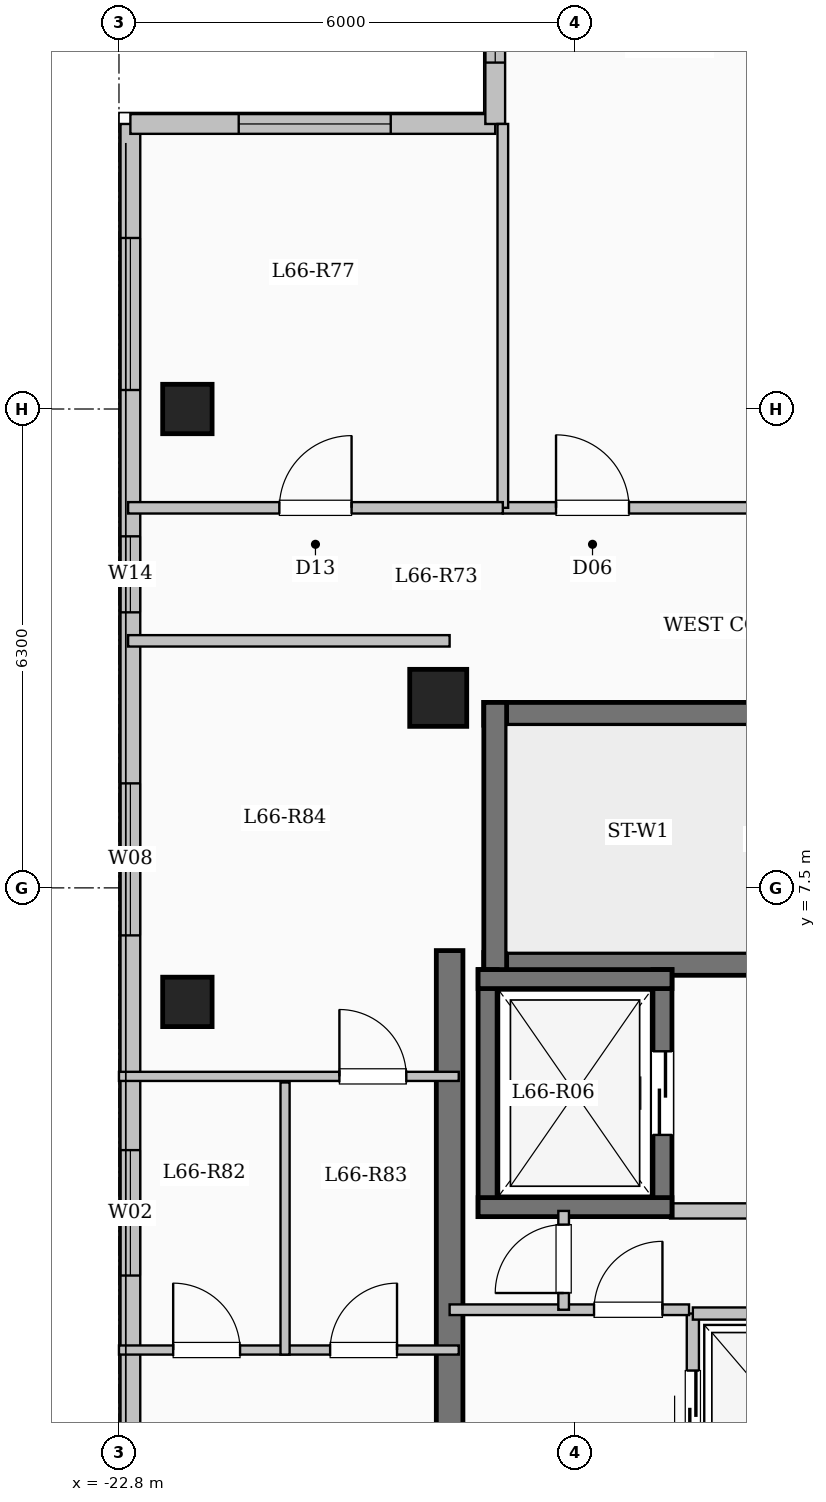
"""IFC4 building model, lengths in metres.
Left out: names, types, materials, properties, quantities, classifications, styles, units other than length and angle.
Written with IfcOpenShell. Run it as: python <this file> out.ifc"""

import sys

from ifc_helpers import new_model, si_unit, direction, frame, frame_2d, origin, origin_2d, place, context, subcontext, project, spatial, rectangle, extrude, element, fill, save


model = new_model("IFC4")
c1 = context("Model", 3, precision=1e-05, world=origin(), true_north=direction((0.0, 1.0)))
c2 = subcontext(c1, "Body", "Model", "MODEL_VIEW")
j1 = project(units=[si_unit("LENGTHUNIT", "METRE"), si_unit("PLANEANGLEUNIT", "RADIAN")], contexts=[c1])
p1 = place(None, origin())
s1 = spatial("IfcSite", under=j1, at=p1, CompositionType="ELEMENT")
p2 = place(p1, origin())
s2 = spatial("IfcBuilding", under=s1, at=p2, CompositionType="ELEMENT")
p3 = place(p2, frame((0.0, 0.0, 244.85)))
s3 = spatial("IfcBuildingStorey", under=s2, at=p3, CompositionType="ELEMENT", Elevation=244.85)
p4 = place(p3, frame((-18.6, 10.0, 0.0), z_axis=(0.0, 0.0, 1.0), x_axis=(1.0, 0.0, 0.0)))
e1 = element("IfcColumn", 1, at=p4, inside=s3, PredefinedType="COLUMN", context=c2, shape_type="SweptSolid", body=[
    extrude(rectangle(XDim=0.75, YDim=0.75, at=origin_2d()), origin(), (0.0, 0.0, 1.0), 3.35),
])
for number, where, z_axis, x_axis in (
    (2, (-21.9, 6.0, 0.0), (0.0, 0.0, 1.0), (1.0, 0.0, 0.0)),
    (3, (-21.9, 13.8, 0.0), (0.0, 0.0, 1.0), (1.0, 0.0, 0.0)),
):
    element("IfcColumn", number, at=place(p3, frame(where, z_axis=z_axis, x_axis=x_axis)), inside=s3, PredefinedType="COLUMN", context=c2, shape_type="SweptSolid", body=[
        extrude(rectangle(XDim=0.65, YDim=0.65, at=origin_2d()), origin(), (0.0, 0.0, 1.0), 3.35),
    ])
p5 = place(p3, frame((-22.65, -17.55, 0.0), z_axis=(0.0, 0.0, 1.0), x_axis=(0.0, 1.0, 0.0)))
e4 = element("IfcWall", 4, at=p5, inside=s3, PredefinedType="SOLIDWALL", context=c2, shape_type="SweptSolid", body=[
    extrude(rectangle(XDim=35.1, YDim=0.26, at=frame_2d((17.55, 0.0))), origin(), (0.0, 0.0, 1.0), 3.1),
])
p6 = place(p5, frame((2.975, 0.0, 0.9)))
e5 = element("IfcOpeningElement", 5, at=p6, cuts=e4, PredefinedType="OPENING", context=c2, shape_type="SweptSolid", body=[
    extrude(rectangle(XDim=2.2, YDim=1.75, at=frame_2d((1.1, 0.875))), frame((0.0, 0.14, 0.0), z_axis=(0.0, -1.0, 0.0), x_axis=(1.0, 0.0, 0.0)), (0.0, 0.0, 1.0), 0.28),
])
p7 = place(p5, frame((8.625, 0.0, 0.95)))
e6 = element("IfcOpeningElement", 6, at=p7, cuts=e4, PredefinedType="OPENING", context=c2, shape_type="SweptSolid", body=[
    extrude(rectangle(XDim=1.2, YDim=1.5, at=frame_2d((0.6, 0.75))), frame((0.0, 0.14, 0.0), z_axis=(0.0, -1.0, 0.0), x_axis=(1.0, 0.0, 0.0)), (0.0, 0.0, 1.0), 0.28),
])
p8 = place(p5, frame((13.55, 0.0, 0.9)))
e7 = element("IfcOpeningElement", 7, at=p8, cuts=e4, PredefinedType="OPENING", context=c2, shape_type="SweptSolid", body=[
    extrude(rectangle(XDim=2.2, YDim=1.75, at=frame_2d((1.1, 0.875))), frame((0.0, 0.14, 0.0), z_axis=(0.0, -1.0, 0.0), x_axis=(1.0, 0.0, 0.0)), (0.0, 0.0, 1.0), 0.28),
])
p9 = place(p5, frame((19.95, 0.0, 0.9)))
e8 = element("IfcOpeningElement", 8, at=p9, cuts=e4, PredefinedType="OPENING", context=c2, shape_type="SweptSolid", body=[
    extrude(rectangle(XDim=1.65, YDim=1.6, at=frame_2d((0.825, 0.8))), frame((0.0, 0.14, 0.0), z_axis=(0.0, -1.0, 0.0), x_axis=(1.0, 0.0, 0.0)), (0.0, 0.0, 1.0), 0.28),
])
p10 = place(p5, frame((24.425, 0.0, 0.9)))
e9 = element("IfcOpeningElement", 9, at=p10, cuts=e4, PredefinedType="OPENING", context=c2, shape_type="SweptSolid", body=[
    extrude(rectangle(XDim=2.0, YDim=1.7, at=frame_2d((1.0, 0.85))), frame((0.0, 0.14, 0.0), z_axis=(0.0, -1.0, 0.0), x_axis=(1.0, 0.0, 0.0)), (0.0, 0.0, 1.0), 0.28),
])
p11 = place(p5, frame((28.675, 0.0, 0.95)))
e10 = element("IfcOpeningElement", 10, at=p11, cuts=e4, PredefinedType="OPENING", context=c2, shape_type="SweptSolid", body=[
    extrude(rectangle(XDim=1.0, YDim=1.5, at=frame_2d((0.5, 0.75))), frame((0.0, 0.14, 0.0), z_axis=(0.0, -1.0, 0.0), x_axis=(1.0, 0.0, 0.0)), (0.0, 0.0, 1.0), 0.28),
])
p12 = place(p5, frame((31.6, 0.0, 0.9)))
e11 = element("IfcOpeningElement", 11, at=p12, cuts=e4, PredefinedType="OPENING", context=c2, shape_type="SweptSolid", body=[
    extrude(rectangle(XDim=2.0, YDim=1.7, at=frame_2d((1.0, 0.85))), frame((0.0, 0.14, 0.0), z_axis=(0.0, -1.0, 0.0), x_axis=(1.0, 0.0, 0.0)), (0.0, 0.0, 1.0), 0.28),
])
p13 = place(p3, frame((-22.65, 17.55, 0.0), z_axis=(0.0, 0.0, 1.0), x_axis=(1.0, 0.0, 0.0)))
e12 = element("IfcWall", 12, at=p13, inside=s3, PredefinedType="SOLIDWALL", context=c2, shape_type="SweptSolid", body=[
    extrude(rectangle(XDim=4.8, YDim=0.26, at=frame_2d((2.4, 0.0))), origin(), (0.0, 0.0, 1.0), 3.1),
])
p14 = place(p13, frame((1.425, 0.0, 0.9)))
e13 = element("IfcOpeningElement", 13, at=p14, cuts=e12, PredefinedType="OPENING", context=c2, shape_type="SweptSolid", body=[
    extrude(rectangle(XDim=2.0, YDim=1.7, at=frame_2d((1.0, 0.85))), frame((0.0, 0.14, 0.0), z_axis=(0.0, -1.0, 0.0), x_axis=(1.0, 0.0, 0.0)), (0.0, 0.0, 1.0), 0.28),
])
p15 = place(p3, frame((-17.85, 17.55, 0.0), z_axis=(0.0, 0.0, 1.0), x_axis=(0.0, 1.0, 0.0)))
e14 = element("IfcWall", 14, at=p15, inside=s3, PredefinedType="SOLIDWALL", context=c2, shape_type="SweptSolid", body=[
    extrude(rectangle(XDim=3.3, YDim=0.26, at=frame_2d((1.65, 0.0))), origin(), (0.0, 0.0, 1.0), 3.1),
])
p16 = place(p15, frame((0.808, 0.0, 0.9)))
e15 = element("IfcOpeningElement", 15, at=p16, cuts=e14, PredefinedType="OPENING", context=c2, shape_type="SweptSolid", body=[
    extrude(rectangle(XDim=1.65, YDim=1.6, at=frame_2d((0.825, 0.8))), frame((0.0, 0.14, 0.0), z_axis=(0.0, -1.0, 0.0), x_axis=(1.0, 0.0, 0.0)), (0.0, 0.0, 1.0), 0.28),
])
p17 = place(p3, frame((-18.0, 9.79, 0.0), z_axis=(0.0, 0.0, 1.0), x_axis=(1.0, 0.0, 0.0)))
e16 = element("IfcWall", 16, at=p17, inside=s3, PredefinedType="SHEAR", context=c2, shape_type="SweptSolid", body=[
    extrude(rectangle(XDim=8.0, YDim=0.3, at=frame_2d((4.0, 0.0))), origin(), (0.0, 0.0, 1.0), 3.35),
])
p18 = place(p3, frame((-18.0, 6.5, 0.0), z_axis=(0.0, 0.0, 1.0), x_axis=(1.0, 0.0, 0.0)))
e17 = element("IfcWall", 17, at=p18, inside=s3, PredefinedType="SHEAR", context=c2, shape_type="SweptSolid", body=[
    extrude(rectangle(XDim=8.0, YDim=0.3, at=frame_2d((4.0, 0.0))), origin(), (0.0, 0.0, 1.0), 3.35),
])
p19 = place(p18, frame((6.45, 0.0, 0.0)))
e18 = element("IfcOpeningElement", 18, at=p19, cuts=e17, PredefinedType="OPENING", context=c2, shape_type="SweptSolid", body=[
    extrude(rectangle(XDim=1.0, YDim=2.15, at=frame_2d((0.5, 1.075))), frame((0.0, 0.16, 0.0), z_axis=(0.0, -1.0, 0.0), x_axis=(1.0, 0.0, 0.0)), (0.0, 0.0, 1.0), 0.32),
])
p20 = place(p3, frame((-17.85, 6.35, 0.0), z_axis=(0.0, 0.0, 1.0), x_axis=(0.0, 1.0, 0.0)))
e19 = element("IfcWall", 19, at=p20, inside=s3, PredefinedType="SHEAR", context=c2, shape_type="SweptSolid", body=[
    extrude(rectangle(XDim=3.59, YDim=0.3, at=frame_2d((1.795, 0.0))), origin(), (0.0, 0.0, 1.0), 3.35),
])
p21 = place(p3, frame((-15.55, 3.25, 0.0), z_axis=(0.0, 0.0, 1.0), x_axis=(1.0, 0.0, 0.0)))
e20 = element("IfcWall", 20, at=p21, inside=s3, PredefinedType="SOLIDWALL", context=c2, shape_type="SweptSolid", body=[
    extrude(rectangle(XDim=5.4, YDim=0.2, at=frame_2d((2.7, 0.0))), origin(), (0.0, 0.0, 1.0), 3.1),
])
p22 = place(p3, frame((-17.95, 3.175, 0.0), z_axis=(0.0, 0.0, 1.0), x_axis=(0.0, 1.0, 0.0)))
e21 = element("IfcWall", 21, at=p22, inside=s3, PredefinedType="SHEAR", context=c2, shape_type="SweptSolid", body=[
    extrude(rectangle(XDim=3.25, YDim=0.25, at=frame_2d((1.625, 0.0))), origin(), (0.0, 0.0, 1.0), 3.35),
])
p23 = place(p3, frame((-15.65, 3.175, 0.0), z_axis=(0.0, 0.0, 1.0), x_axis=(0.0, 1.0, 0.0)))
e22 = element("IfcWall", 22, at=p23, inside=s3, PredefinedType="SHEAR", context=c2, shape_type="SweptSolid", body=[
    extrude(rectangle(XDim=3.25, YDim=0.25, at=frame_2d((1.625, 0.0))), origin(), (0.0, 0.0, 1.0), 3.35),
])
p24 = place(p23, frame((1.075, 0.0, 0.0)))
e23 = element("IfcOpeningElement", 23, at=p24, cuts=e22, PredefinedType="OPENING", context=c2, shape_type="SweptSolid", body=[
    extrude(rectangle(XDim=1.1, YDim=2.15, at=frame_2d((0.55, 1.075))), frame((0.0, 0.135, 0.0), z_axis=(0.0, -1.0, 0.0), x_axis=(1.0, 0.0, 0.0)), (0.0, 0.0, 1.0), 0.27),
])
for number, where, z_axis, x_axis in (
    (24, (-18.075, 3.3, 0.0), (0.0, 0.0, 1.0), (1.0, 0.0, 0.0)),
    (25, (-18.075, 6.3, 0.0), (0.0, 0.0, 1.0), (1.0, 0.0, 0.0)),
):
    element("IfcWall", number, at=place(p3, frame(where, z_axis=z_axis, x_axis=x_axis)), inside=s3, PredefinedType="SHEAR", context=c2, shape_type="SweptSolid", body=[
        extrude(rectangle(XDim=2.55, YDim=0.25, at=frame_2d((1.275, 0.0))), origin(), (0.0, 0.0, 1.0), 3.35),
    ])
p25 = place(p3, frame((-15.25, -0.7, 0.0), z_axis=(0.0, 0.0, 1.0), x_axis=(0.0, 1.0, 0.0)))
e26 = element("IfcWall", 26, at=p25, inside=s3, PredefinedType="SOLIDWALL", context=c2, shape_type="SweptSolid", body=[
    extrude(rectangle(XDim=2.6, YDim=0.16, at=frame_2d((1.3, 0.0))), origin(), (0.0, 0.0, 1.0), 3.1),
])
p26 = place(p25, frame((0.75, 0.0, 0.0)))
e27 = element("IfcOpeningElement", 27, at=p26, cuts=e26, PredefinedType="OPENING", context=c2, shape_type="SweptSolid", body=[
    extrude(rectangle(XDim=1.1, YDim=2.15, at=frame_2d((0.55, 1.075))), frame((0.0, 0.09, 0.0), z_axis=(0.0, -1.0, 0.0), x_axis=(1.0, 0.0, 0.0)), (0.0, 0.0, 1.0), 0.18),
])
p27 = place(p3, frame((-15.25, 1.9, 0.0), z_axis=(0.0, 0.0, 1.0), x_axis=(1.0, 0.0, 0.0)))
e28 = element("IfcWall", 28, at=p27, inside=s3, PredefinedType="SOLIDWALL", context=c2, shape_type="SweptSolid", body=[
    extrude(rectangle(XDim=2.3, YDim=0.16, at=frame_2d((1.15, 0.0))), origin(), (0.0, 0.0, 1.0), 3.1),
])
p28 = place(p3, frame((-18.45, -7.375, 0.0), z_axis=(0.0, 0.0, 1.0), x_axis=(0.0, 1.0, 0.0)))
e29 = element("IfcWall", 29, at=p28, inside=s3, PredefinedType="SHEAR", context=c2, shape_type="SweptSolid", body=[
    extrude(rectangle(XDim=14.05, YDim=0.35, at=frame_2d((7.025, 0.0))), origin(), (0.0, 0.0, 1.0), 3.35),
])
p29 = place(p3, frame((-18.45, 1.95, 0.0), z_axis=(0.0, 0.0, 1.0), x_axis=(1.0, 0.0, 0.0)))
e30 = element("IfcWall", 30, at=p29, inside=s3, PredefinedType="PARTITIONING", context=c2, shape_type="SweptSolid", body=[
    extrude(rectangle(XDim=3.15, YDim=0.14, at=frame_2d((1.575, 0.0))), origin(), (0.0, 0.0, 1.0), 3.1),
])
p30 = place(p29, frame((1.9, 0.0, 0.0)))
e31 = element("IfcOpeningElement", 31, at=p30, cuts=e30, PredefinedType="OPENING", context=c2, shape_type="SweptSolid", body=[
    extrude(rectangle(XDim=0.9, YDim=2.08, at=frame_2d((0.45, 1.04))), frame((0.0, 0.08, 0.0), z_axis=(0.0, -1.0, 0.0), x_axis=(1.0, 0.0, 0.0)), (0.0, 0.0, 1.0), 0.16),
])
p31 = place(p3, frame((-16.95, 1.95, 0.0), z_axis=(0.0, 0.0, 1.0), x_axis=(0.0, 1.0, 0.0)))
e32 = element("IfcWall", 32, at=p31, inside=s3, PredefinedType="PARTITIONING", context=c2, shape_type="SweptSolid", body=[
    extrude(rectangle(XDim=1.3, YDim=0.14, at=frame_2d((0.65, 0.0))), origin(), (0.0, 0.0, 1.0), 3.1),
])
p32 = place(p31, frame((0.22, 0.0, 0.0)))
e33 = element("IfcOpeningElement", 33, at=p32, cuts=e32, PredefinedType="OPENING", context=c2, shape_type="SweptSolid", body=[
    extrude(rectangle(XDim=0.9, YDim=2.08, at=frame_2d((0.45, 1.04))), frame((0.0, 0.08, 0.0), z_axis=(0.0, -1.0, 0.0), x_axis=(1.0, 0.0, 0.0)), (0.0, 0.0, 1.0), 0.16),
])
p33 = place(p3, frame((-17.75, 12.5, 0.0), z_axis=(0.0, 0.0, 1.0), x_axis=(1.0, 0.0, 0.0)))
e34 = element("IfcWall", 34, at=p33, inside=s3, PredefinedType="PARTITIONING", context=c2, shape_type="SweptSolid", body=[
    extrude(rectangle(XDim=13.9, YDim=0.15, at=frame_2d((6.95, 0.0))), origin(), (0.0, 0.0, 1.0), 3.1),
])
p34 = place(p33, frame((0.7, 0.0, 0.0)))
e35 = element("IfcOpeningElement", 35, at=p34, cuts=e34, PredefinedType="OPENING", context=c2, shape_type="SweptSolid", body=[
    extrude(rectangle(XDim=0.96, YDim=2.15, at=frame_2d((0.48, 1.075))), frame((0.0, 0.085, 0.0), z_axis=(0.0, -1.0, 0.0), x_axis=(1.0, 0.0, 0.0)), (0.0, 0.0, 1.0), 0.17),
])
p35 = place(p33, frame((9.484, 0.0, 0.0)))
e36 = element("IfcOpeningElement", 36, at=p35, cuts=e34, PredefinedType="OPENING", context=c2, shape_type="SweptSolid", body=[
    extrude(rectangle(XDim=0.96, YDim=2.15, at=frame_2d((0.48, 1.075))), frame((0.0, 0.085, 0.0), z_axis=(0.0, -1.0, 0.0), x_axis=(1.0, 0.0, 0.0)), (0.0, 0.0, 1.0), 0.17),
])
p36 = place(p3, frame((-22.68, 10.75, 0.0), z_axis=(0.0, 0.0, 1.0), x_axis=(1.0, 0.0, 0.0)))
e37 = element("IfcWall", 37, at=p36, inside=s3, PredefinedType="PARTITIONING", context=c2, shape_type="SweptSolid", body=[
    extrude(rectangle(XDim=4.23, YDim=0.15, at=frame_2d((2.115, 0.0))), origin(), (0.0, 0.0, 1.0), 3.1),
])
p37 = place(p3, frame((-17.75, 12.5, 0.0), z_axis=(0.0, 0.0, 1.0), x_axis=(0.0, 1.0, 0.0)))
e38 = element("IfcWall", 38, at=p37, inside=s3, PredefinedType="PARTITIONING", context=c2, shape_type="SweptSolid", body=[
    extrude(rectangle(XDim=5.05, YDim=0.14, at=frame_2d((2.525, 0.0))), origin(), (0.0, 0.0, 1.0), 3.1),
])
p38 = place(p3, frame((-22.68, 12.5, 0.0), z_axis=(0.0, 0.0, 1.0), x_axis=(1.0, 0.0, 0.0)))
e39 = element("IfcWall", 39, at=p38, inside=s3, PredefinedType="PARTITIONING", context=c2, shape_type="SweptSolid", body=[
    extrude(rectangle(XDim=4.93, YDim=0.15, at=frame_2d((2.465, 0.0))), origin(), (0.0, 0.0, 1.0), 3.1),
])
p39 = place(p38, frame((1.99, 0.0, 0.0)))
e40 = element("IfcOpeningElement", 40, at=p39, cuts=e39, PredefinedType="OPENING", context=c2, shape_type="SweptSolid", body=[
    extrude(rectangle(XDim=0.95, YDim=2.15, at=frame_2d((0.475, 1.075))), frame((0.0, 0.085, 0.0), z_axis=(0.0, -1.0, 0.0), x_axis=(1.0, 0.0, 0.0)), (0.0, 0.0, 1.0), 0.17),
])
p40 = place(p3, frame((-22.8, 1.42, 0.0), z_axis=(0.0, 0.0, 1.0), x_axis=(1.0, 0.0, 0.0)))
e41 = element("IfcWall", 41, at=p40, inside=s3, PredefinedType="PARTITIONING", context=c2, shape_type="SweptSolid", body=[
    extrude(rectangle(XDim=4.47, YDim=0.12, at=frame_2d((2.235, 0.0))), origin(), (0.0, 0.0, 1.0), 3.1),
])
p41 = place(p40, frame((0.713, 0.0, 0.0)))
e42 = element("IfcOpeningElement", 42, at=p41, cuts=e41, PredefinedType="OPENING", context=c2, shape_type="SweptSolid", body=[
    extrude(rectangle(XDim=0.88, YDim=2.1, at=frame_2d((0.44, 1.05))), frame((0.0, 0.07, 0.0), z_axis=(0.0, -1.0, 0.0), x_axis=(1.0, 0.0, 0.0)), (0.0, 0.0, 1.0), 0.14),
])
p42 = place(p40, frame((2.778, 0.0, 0.0)))
e43 = element("IfcOpeningElement", 43, at=p42, cuts=e41, PredefinedType="OPENING", context=c2, shape_type="SweptSolid", body=[
    extrude(rectangle(XDim=0.88, YDim=2.1, at=frame_2d((0.44, 1.05))), frame((0.0, 0.07, 0.0), z_axis=(0.0, -1.0, 0.0), x_axis=(1.0, 0.0, 0.0)), (0.0, 0.0, 1.0), 0.14),
])
p43 = place(p3, frame((-22.8, 5.02, 0.0), z_axis=(0.0, 0.0, 1.0), x_axis=(1.0, 0.0, 0.0)))
e44 = element("IfcWall", 44, at=p43, inside=s3, PredefinedType="PARTITIONING", context=c2, shape_type="SweptSolid", body=[
    extrude(rectangle(XDim=4.47, YDim=0.12, at=frame_2d((2.235, 0.0))), origin(), (0.0, 0.0, 1.0), 3.1),
])
p44 = place(p43, frame((2.9, 0.0, 0.0)))
e45 = element("IfcOpeningElement", 45, at=p44, cuts=e44, PredefinedType="OPENING", context=c2, shape_type="SweptSolid", body=[
    extrude(rectangle(XDim=0.88, YDim=2.1, at=frame_2d((0.44, 1.05))), frame((0.0, 0.07, 0.0), z_axis=(0.0, -1.0, 0.0), x_axis=(1.0, 0.0, 0.0)), (0.0, 0.0, 1.0), 0.14),
])
p45 = place(p3, frame((-20.615, 1.36, 0.0), z_axis=(0.0, 0.0, 1.0), x_axis=(0.0, 1.0, 0.0)))
e46 = element("IfcWall", 46, at=p45, inside=s3, PredefinedType="PARTITIONING", context=c2, shape_type="SweptSolid", body=[
    extrude(rectangle(XDim=3.58, YDim=0.12, at=frame_2d((1.79, 0.0))), origin(), (0.0, 0.0, 1.0), 3.1),
])
p46 = place(p9, origin())
e47 = element("IfcWindow", 47, at=p46, inside=s3, PartitioningType="SINGLE_PANEL", PredefinedType="WINDOW", context=c2, shape_type="SweptSolid", body=[
    extrude(rectangle(XDim=1.65, YDim=1.6, at=frame_2d((0.825, 0.8))), frame((0.0, 0.03, 0.0), z_axis=(0.0, -1.0, 0.0), x_axis=(1.0, 0.0, 0.0)), (0.0, 0.0, 1.0), 0.06),
])
fill(e8, e47)
p47 = place(p10, origin())
e48 = element("IfcWindow", 48, at=p47, inside=s3, PartitioningType="SINGLE_PANEL", PredefinedType="WINDOW", context=c2, shape_type="SweptSolid", body=[
    extrude(rectangle(XDim=2.0, YDim=1.7, at=frame_2d((1.0, 0.85))), frame((0.0, 0.03, 0.0), z_axis=(0.0, -1.0, 0.0), x_axis=(1.0, 0.0, 0.0)), (0.0, 0.0, 1.0), 0.06),
])
fill(e9, e48)
p48 = place(p11, origin())
e49 = element("IfcWindow", 49, at=p48, inside=s3, PartitioningType="SINGLE_PANEL", PredefinedType="WINDOW", context=c2, shape_type="SweptSolid", body=[
    extrude(rectangle(XDim=1.0, YDim=1.5, at=frame_2d((0.5, 0.75))), frame((0.0, 0.03, 0.0), z_axis=(0.0, -1.0, 0.0), x_axis=(1.0, 0.0, 0.0)), (0.0, 0.0, 1.0), 0.06),
])
fill(e10, e49)
p49 = place(p12, origin())
e50 = element("IfcWindow", 50, at=p49, inside=s3, PartitioningType="SINGLE_PANEL", PredefinedType="WINDOW", context=c2, shape_type="SweptSolid", body=[
    extrude(rectangle(XDim=2.0, YDim=1.7, at=frame_2d((1.0, 0.85))), frame((0.0, 0.03, 0.0), z_axis=(0.0, -1.0, 0.0), x_axis=(1.0, 0.0, 0.0)), (0.0, 0.0, 1.0), 0.06),
])
fill(e11, e50)
p50 = place(p14, origin())
e51 = element("IfcWindow", 51, at=p50, inside=s3, PartitioningType="SINGLE_PANEL", PredefinedType="WINDOW", context=c2, shape_type="SweptSolid", body=[
    extrude(rectangle(XDim=2.0, YDim=1.7, at=frame_2d((1.0, 0.85))), frame((0.0, 0.03, 0.0), z_axis=(0.0, -1.0, 0.0), x_axis=(1.0, 0.0, 0.0)), (0.0, 0.0, 1.0), 0.06),
])
fill(e13, e51)
p51 = place(p16, origin())
e52 = element("IfcWindow", 52, at=p51, inside=s3, PartitioningType="SINGLE_PANEL", PredefinedType="WINDOW", context=c2, shape_type="SweptSolid", body=[
    extrude(rectangle(XDim=1.65, YDim=1.6, at=frame_2d((0.825, 0.8))), frame((0.0, 0.03, 0.0), z_axis=(0.0, -1.0, 0.0), x_axis=(1.0, 0.0, 0.0)), (0.0, 0.0, 1.0), 0.06),
])
fill(e15, e52)
p52 = place(p24, origin())
e53 = element("IfcDoor", 53, at=p52, inside=s3, OperationType="SLIDING_TO_LEFT", PredefinedType="DOOR", context=c2, shape_type="SweptSolid", body=[
    extrude(rectangle(XDim=1.1, YDim=2.15, at=frame_2d((0.55, 1.075))), frame((0.0, 0.025, 0.0), z_axis=(0.0, -1.0, 0.0), x_axis=(1.0, 0.0, 0.0)), (0.0, 0.0, 1.0), 0.05),
])
fill(e23, e53)
p53 = place(p26, origin())
e54 = element("IfcDoor", 54, at=p53, inside=s3, OperationType="SLIDING_TO_LEFT", PredefinedType="DOOR", context=c2, shape_type="SweptSolid", body=[
    extrude(rectangle(XDim=1.1, YDim=2.15, at=frame_2d((0.55, 1.075))), frame((0.0, 0.025, 0.0), z_axis=(0.0, -1.0, 0.0), x_axis=(1.0, 0.0, 0.0)), (0.0, 0.0, 1.0), 0.05),
])
fill(e27, e54)
p54 = place(p30, origin())
e55 = element("IfcDoor", 55, at=p54, inside=s3, OperationType="SINGLE_SWING_RIGHT", PredefinedType="DOOR", context=c2, shape_type="SweptSolid", body=[
    extrude(rectangle(XDim=0.9, YDim=2.08, at=frame_2d((0.45, 1.04))), frame((0.0, 0.025, 0.0), z_axis=(0.0, -1.0, 0.0), x_axis=(1.0, 0.0, 0.0)), (0.0, 0.0, 1.0), 0.05),
])
fill(e31, e55)
p55 = place(p32, origin())
e56 = element("IfcDoor", 56, at=p55, inside=s3, OperationType="SINGLE_SWING_LEFT", PredefinedType="DOOR", context=c2, shape_type="SweptSolid", body=[
    extrude(rectangle(XDim=0.9, YDim=2.08, at=frame_2d((0.45, 1.04))), frame((0.0, 0.025, 0.0), z_axis=(0.0, -1.0, 0.0), x_axis=(1.0, 0.0, 0.0)), (0.0, 0.0, 1.0), 0.05),
])
fill(e33, e56)
p56 = place(p34, origin())
e57 = element("IfcDoor", 57, at=p56, inside=s3, OperationType="SINGLE_SWING_LEFT", PredefinedType="DOOR", context=c2, shape_type="SweptSolid", body=[
    extrude(rectangle(XDim=0.96, YDim=2.15, at=frame_2d((0.48, 1.075))), frame((0.0, 0.025, 0.0), z_axis=(0.0, -1.0, 0.0), x_axis=(1.0, 0.0, 0.0)), (0.0, 0.0, 1.0), 0.05),
])
fill(e35, e57)
p57 = place(p39, origin())
e58 = element("IfcDoor", 58, at=p57, inside=s3, OperationType="SINGLE_SWING_RIGHT", PredefinedType="DOOR", context=c2, shape_type="SweptSolid", body=[
    extrude(rectangle(XDim=0.95, YDim=2.15, at=frame_2d((0.475, 1.075))), frame((0.0, 0.025, 0.0), z_axis=(0.0, -1.0, 0.0), x_axis=(1.0, 0.0, 0.0)), (0.0, 0.0, 1.0), 0.05),
])
fill(e40, e58)
p58 = place(p41, origin())
e59 = element("IfcDoor", 59, at=p58, inside=s3, OperationType="SINGLE_SWING_LEFT", PredefinedType="DOOR", context=c2, shape_type="SweptSolid", body=[
    extrude(rectangle(XDim=0.88, YDim=2.1, at=frame_2d((0.44, 1.05))), frame((0.0, 0.025, 0.0), z_axis=(0.0, -1.0, 0.0), x_axis=(1.0, 0.0, 0.0)), (0.0, 0.0, 1.0), 0.05),
])
fill(e42, e59)
p59 = place(p42, origin())
e60 = element("IfcDoor", 60, at=p59, inside=s3, OperationType="SINGLE_SWING_RIGHT", PredefinedType="DOOR", context=c2, shape_type="SweptSolid", body=[
    extrude(rectangle(XDim=0.88, YDim=2.1, at=frame_2d((0.44, 1.05))), frame((0.0, 0.025, 0.0), z_axis=(0.0, -1.0, 0.0), x_axis=(1.0, 0.0, 0.0)), (0.0, 0.0, 1.0), 0.05),
])
fill(e43, e60)
p60 = place(p44, origin())
e61 = element("IfcDoor", 61, at=p60, inside=s3, OperationType="SINGLE_SWING_LEFT", PredefinedType="DOOR", context=c2, shape_type="SweptSolid", body=[
    extrude(rectangle(XDim=0.88, YDim=2.1, at=frame_2d((0.44, 1.05))), frame((0.0, 0.025, 0.0), z_axis=(0.0, -1.0, 0.0), x_axis=(1.0, 0.0, 0.0)), (0.0, 0.0, 1.0), 0.05),
])
fill(e45, e61)
save(model, sys.argv[1])
